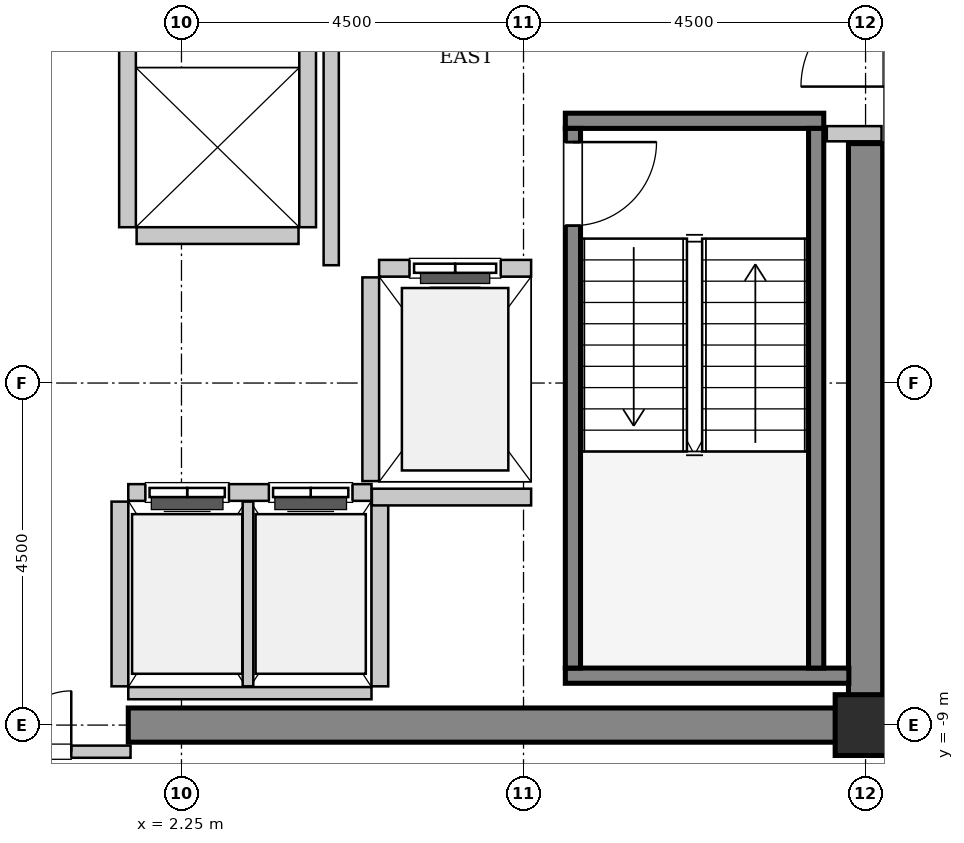
"""IFC4 building model, lengths in metres.
Left out: names, types, materials, properties, quantities, classifications, styles, units other than length and angle.
Written with IfcOpenShell. Run it as: python <this file> out.ifc"""

import sys

from ifc_helpers import new_model, si_unit, direction, frame, frame_2d, origin, origin_2d, place, context, subcontext, project, spatial, rectangle, hollow_rectangle, extrude, source, transform, mapped, element, fill, save


model = new_model("IFC4")
c1 = context("Model", 3, precision=1e-05, world=origin(), true_north=direction((0.0, 1.0)))
c2 = subcontext(c1, "Body", "Model", "MODEL_VIEW")
j1 = project(units=[si_unit("LENGTHUNIT", "METRE"), si_unit("PLANEANGLEUNIT", "RADIAN")], contexts=[c1])
p1 = place(None, origin())
s1 = spatial("IfcSite", under=j1, at=p1, CompositionType="ELEMENT")
p2 = place(p1, origin())
s2 = spatial("IfcBuilding", under=s1, at=p2, CompositionType="ELEMENT")
p3 = place(p2, frame((0.0, 0.0, 248.4)))
s3 = spatial("IfcBuildingStorey", under=s2, at=p3, CompositionType="ELEMENT", Elevation=248.4)
m1 = source(origin(), c2, "Body", "SweptSolid", [
    extrude(rectangle(XDim=9.925, YDim=0.45, at=frame_2d((4.962, 0.0))), origin(), (0.0, 0.0, 1.0), 3.8),
])
p4 = place(p3, frame((1.55, -9.0, 0.0), z_axis=(0.0, 0.0, 1.0), x_axis=(1.0, 0.0, 0.0)))
e1 = element("IfcWall", 1, at=p4, inside=s3, PredefinedType="SHEAR", context=c2, shape_type="MappedRepresentation", body=[
    mapped(m1, transform((0.0, 0.0, 0.0), x_axis=(1.0, 0.0, 0.0), y_axis=(0.0, 1.0, 0.0), z_axis=(0.0, 0.0, 1.0), scale=1.0)),
])
m2 = source(origin(), c2, "Body", "SweptSolid", [
    extrude(rectangle(XDim=7.425, YDim=0.45, at=frame_2d((3.712, 0.0))), origin(), (0.0, 0.0, 1.0), 3.8),
])
p5 = place(p3, frame((11.25, -8.775, 0.0), z_axis=(0.0, 0.0, 1.0), x_axis=(0.0, 1.0, 0.0)))
e2 = element("IfcWall", 2, at=p5, inside=s3, PredefinedType="SHEAR", context=c2, shape_type="MappedRepresentation", body=[
    mapped(m2, transform((0.0, 0.0, 0.0), x_axis=(1.0, 0.0, 0.0), y_axis=(0.0, 1.0, 0.0), z_axis=(0.0, 0.0, 1.0), scale=1.0)),
])
m3 = source(origin(), c2, "Body", "SweptSolid", [
    extrude(hollow_rectangle(XDim=0.8, YDim=0.8, WallThickness=0.04, InnerFilletRadius=0.04, OuterFilletRadius=0.08, at=origin_2d()), origin(), (0.0, 0.0, 1.0), 3.8),
])
p6 = place(p3, frame((11.25, -9.0, 0.0), z_axis=(0.0, 0.0, 1.0), x_axis=(1.0, 0.0, 0.0)))
e3 = element("IfcColumn", 3, at=p6, inside=s3, PredefinedType="COLUMN", context=c2, shape_type="MappedRepresentation", body=[
    mapped(m3, transform((0.0, 0.0, 0.0), x_axis=(1.0, 0.0, 0.0), y_axis=(0.0, 1.0, 0.0), z_axis=(0.0, 0.0, 1.0), scale=1.0)),
])
m4 = source(origin(), c2, "Body", "SweptSolid", [
    extrude(rectangle(XDim=3.4, YDim=0.2, at=frame_2d((1.7, 0.0))), origin(), (0.0, 0.0, 1.0), 3.8),
])
p7 = place(p3, frame((7.3, -1.05, 0.0), z_axis=(0.0, 0.0, 1.0), x_axis=(1.0, 0.0, 0.0)))
e4 = element("IfcWall", 4, at=p7, inside=s3, PredefinedType="SOLIDWALL", context=c2, shape_type="MappedRepresentation", body=[
    mapped(m4, transform((0.0, 0.0, 0.0), x_axis=(1.0, 0.0, 0.0), y_axis=(0.0, 1.0, 0.0), z_axis=(0.0, 0.0, 1.0), scale=1.0)),
])
m5 = source(origin(), c2, "Body", "SweptSolid", [
    extrude(rectangle(XDim=3.73, YDim=0.2, at=frame_2d((1.865, 0.0))), origin(), (0.0, 0.0, 1.0), 3.8),
])
p8 = place(p3, frame((7.3, -8.35, 0.0), z_axis=(0.0, 0.0, 1.0), x_axis=(1.0, 0.0, 0.0)))
e5 = element("IfcWall", 5, at=p8, inside=s3, PredefinedType="SOLIDWALL", context=c2, shape_type="MappedRepresentation", body=[
    mapped(m5, transform((0.0, 0.0, 0.0), x_axis=(1.0, 0.0, 0.0), y_axis=(0.0, 1.0, 0.0), z_axis=(0.0, 0.0, 1.0), scale=1.0)),
])
m6 = source(origin(), c2, "Body", "SweptSolid", [
    extrude(rectangle(XDim=7.1, YDim=0.2, at=frame_2d((3.55, 0.0))), origin(), (0.0, 0.0, 1.0), 3.8),
])
p9 = place(p3, frame((7.4, -1.15, 0.0), z_axis=(0.0, 0.0, 1.0), x_axis=(0.0, -1.0, 0.0)))
e6 = element("IfcWall", 6, at=p9, inside=s3, PredefinedType="SOLIDWALL", context=c2, shape_type="MappedRepresentation", body=[
    mapped(m6, transform((0.0, 0.0, 0.0), x_axis=(1.0, 0.0, 0.0), y_axis=(0.0, 1.0, 0.0), z_axis=(0.0, 0.0, 1.0), scale=1.0)),
])
p10 = place(p9, frame((0.18, 0.0, 0.0)))
e7 = element("IfcOpeningElement", 7, at=p10, cuts=e6, PredefinedType="OPENING", context=c2, shape_type="SweptSolid", body=[
    extrude(rectangle(XDim=1.1, YDim=2.15, at=frame_2d((0.55, 1.075))), frame((0.0, 0.11, 0.0), z_axis=(0.0, -1.0, 0.0), x_axis=(1.0, 0.0, 0.0)), (0.0, 0.0, 1.0), 0.22),
])
p11 = place(p3, frame((10.6, -1.15, 0.0), z_axis=(0.0, 0.0, 1.0), x_axis=(0.0, -1.0, 0.0)))
e8 = element("IfcWall", 8, at=p11, inside=s3, PredefinedType="SOLIDWALL", context=c2, shape_type="MappedRepresentation", body=[
    mapped(m6, transform((0.0, 0.0, 0.0), x_axis=(1.0, 0.0, 0.0), y_axis=(0.0, 1.0, 0.0), z_axis=(0.0, 0.0, 1.0), scale=1.0)),
])
m7 = source(origin(), c2, "Body", "SweptSolid", [
    extrude(rectangle(XDim=2.0, YDim=0.22, at=frame_2d((1.0, 0.0))), origin(), (0.0, 0.0, 1.0), 3.535),
])
p12 = place(p3, frame((6.85, -2.99, 0.0), z_axis=(0.0, 0.0, 1.0), x_axis=(-1.0, 0.0, 0.0)))
e9 = element("IfcWall", 9, at=p12, inside=s3, PredefinedType="SOLIDWALL", context=c2, shape_type="MappedRepresentation", body=[
    mapped(m7, transform((0.0, 0.0, 0.0), x_axis=(1.0, 0.0, 0.0), y_axis=(0.0, 1.0, 0.0), z_axis=(0.0, 0.0, 1.0), scale=1.0)),
])
p13 = place(p12, frame((0.4, 0.0, 0.0)))
e10 = element("IfcOpeningElement", 10, at=p13, cuts=e9, PredefinedType="OPENING", context=c2, shape_type="SweptSolid", body=[
    extrude(rectangle(XDim=1.2, YDim=2.2, at=frame_2d((0.6, 1.1))), frame((0.0, 0.12, 0.0), z_axis=(0.0, -1.0, 0.0), x_axis=(1.0, 0.0, 0.0)), (0.0, 0.0, 1.0), 0.24),
])
m8 = source(origin(), c2, "Body", "SweptSolid", [
    extrude(rectangle(XDim=2.68, YDim=0.22, at=frame_2d((1.34, 0.0))), origin(), (0.0, 0.0, 1.0), 3.535),
])
p14 = place(p3, frame((4.74, -3.11, 0.0), z_axis=(0.0, 0.0, 1.0), x_axis=(0.0, -1.0, 0.0)))
e11 = element("IfcWall", 11, at=p14, inside=s3, PredefinedType="SOLIDWALL", context=c2, shape_type="MappedRepresentation", body=[
    mapped(m8, transform((0.0, 0.0, 0.0), x_axis=(1.0, 0.0, 0.0), y_axis=(0.0, 1.0, 0.0), z_axis=(0.0, 0.0, 1.0), scale=1.0)),
])
m9 = source(origin(), c2, "Body", "SweptSolid", [
    extrude(rectangle(XDim=3.2, YDim=0.22, at=frame_2d((1.6, 0.0))), origin(), (0.0, 0.0, 1.0), 3.535),
])
p15 = place(p3, frame((4.75, -5.94, 0.0), z_axis=(0.0, 0.0, 1.0), x_axis=(-1.0, 0.0, 0.0)))
e12 = element("IfcWall", 12, at=p15, inside=s3, PredefinedType="SOLIDWALL", context=c2, shape_type="MappedRepresentation", body=[
    mapped(m9, transform((0.0, 0.0, 0.0), x_axis=(1.0, 0.0, 0.0), y_axis=(0.0, 1.0, 0.0), z_axis=(0.0, 0.0, 1.0), scale=1.0)),
])
p16 = place(p15, frame((1.875, 0.0, 0.0)))
e13 = element("IfcOpeningElement", 13, at=p16, cuts=e12, PredefinedType="OPENING", context=c2, shape_type="SweptSolid", body=[
    extrude(rectangle(XDim=1.1, YDim=2.2, at=frame_2d((0.55, 1.1))), frame((0.0, 0.12, 0.0), z_axis=(0.0, -1.0, 0.0), x_axis=(1.0, 0.0, 0.0)), (0.0, 0.0, 1.0), 0.24),
])
p17 = place(p15, frame((0.25, 0.0, 0.0)))
e14 = element("IfcOpeningElement", 14, at=p17, cuts=e12, PredefinedType="OPENING", context=c2, shape_type="SweptSolid", body=[
    extrude(rectangle(XDim=1.1, YDim=2.2, at=frame_2d((0.55, 1.1))), frame((0.0, 0.12, 0.0), z_axis=(0.0, -1.0, 0.0), x_axis=(1.0, 0.0, 0.0)), (0.0, 0.0, 1.0), 0.24),
])
m10 = source(origin(), c2, "Body", "SweptSolid", [
    extrude(rectangle(XDim=3.2, YDim=0.16, at=frame_2d((1.6, 0.0))), origin(), (0.0, 0.0, 1.0), 2.625),
])
p18 = place(p3, frame((1.55, -8.58, 0.0), z_axis=(0.0, 0.0, 1.0), x_axis=(1.0, 0.0, 0.0)))
e15 = element("IfcWall", 15, at=p18, inside=s3, PredefinedType="PARTITIONING", context=c2, shape_type="MappedRepresentation", body=[
    mapped(m10, transform((0.0, 0.0, 0.0), x_axis=(1.0, 0.0, 0.0), y_axis=(0.0, 1.0, 0.0), z_axis=(0.0, 0.0, 1.0), scale=1.0)),
])
m11 = source(origin(), c2, "Body", "SweptSolid", [
    extrude(rectangle(XDim=2.43, YDim=0.22, at=frame_2d((1.215, 0.0))), origin(), (0.0, 0.0, 1.0), 3.535),
])
p19 = place(p3, frame((1.44, -6.06, 0.0), z_axis=(0.0, 0.0, 1.0), x_axis=(0.0, -1.0, 0.0)))
e16 = element("IfcWall", 16, at=p19, inside=s3, PredefinedType="SOLIDWALL", context=c2, shape_type="MappedRepresentation", body=[
    mapped(m11, transform((0.0, 0.0, 0.0), x_axis=(1.0, 0.0, 0.0), y_axis=(0.0, 1.0, 0.0), z_axis=(0.0, 0.0, 1.0), scale=1.0)),
])
m12 = source(origin(), c2, "Body", "SweptSolid", [
    extrude(rectangle(XDim=2.43, YDim=0.14, at=frame_2d((1.215, 0.0))), origin(), (0.0, 0.0, 1.0), 3.535),
])
p20 = place(p3, frame((3.125, -8.49, 0.0), z_axis=(0.0, 0.0, 1.0), x_axis=(0.0, 1.0, 0.0)))
e17 = element("IfcWall", 17, at=p20, inside=s3, PredefinedType="PARTITIONING", context=c2, shape_type="MappedRepresentation", body=[
    mapped(m12, transform((0.0, 0.0, 0.0), x_axis=(1.0, 0.0, 0.0), y_axis=(0.0, 1.0, 0.0), z_axis=(0.0, 0.0, 1.0), scale=1.0)),
])
p21 = place(p3, frame((4.86, -8.49, 0.0), z_axis=(0.0, 0.0, 1.0), x_axis=(0.0, 1.0, 0.0)))
e18 = element("IfcWall", 18, at=p21, inside=s3, PredefinedType="SOLIDWALL", context=c2, shape_type="MappedRepresentation", body=[
    mapped(m11, transform((0.0, 0.0, 0.0), x_axis=(1.0, 0.0, 0.0), y_axis=(0.0, 1.0, 0.0), z_axis=(0.0, 0.0, 1.0), scale=1.0)),
])
m13 = source(origin(), c2, "Body", "SweptSolid", [
    extrude(rectangle(XDim=4.9, YDim=0.22, at=frame_2d((2.45, 0.0))), origin(), (0.0, 0.0, 1.0), 3.535),
])
for number, where, z_axis, x_axis in (
    (19, (1.54, 2.45, 0.0), (0.0, 0.0, 1.0), (0.0, -1.0, 0.0)),
    (20, (3.91, -2.45, 0.0), (0.0, 0.0, 1.0), (0.0, 1.0, 0.0)),
):
    element("IfcWall", number, at=place(p3, frame(where, z_axis=z_axis, x_axis=x_axis)), inside=s3, PredefinedType="SOLIDWALL", context=c2, shape_type="MappedRepresentation", body=[
        mapped(m13, transform((0.0, 0.0, 0.0), x_axis=(1.0, 0.0, 0.0), y_axis=(0.0, 1.0, 0.0), z_axis=(0.0, 0.0, 1.0), scale=1.0)),
    ])
m14 = source(origin(), c2, "Body", "SweptSolid", [
    extrude(rectangle(XDim=2.13, YDim=0.22, at=frame_2d((1.065, 0.0))), origin(), (0.0, 0.0, 1.0), 3.535),
])
p22 = place(p3, frame((1.66, -2.56, 0.0), z_axis=(0.0, 0.0, 1.0), x_axis=(1.0, 0.0, 0.0)))
e21 = element("IfcWall", 21, at=p22, inside=s3, PredefinedType="SOLIDWALL", context=c2, shape_type="MappedRepresentation", body=[
    mapped(m14, transform((0.0, 0.0, 0.0), x_axis=(1.0, 0.0, 0.0), y_axis=(0.0, 1.0, 0.0), z_axis=(0.0, 0.0, 1.0), scale=1.0)),
])
m15 = source(origin(), c2, "Body", "SweptSolid", [
    extrude(rectangle(XDim=2.095, YDim=0.22, at=frame_2d((1.048, 0.0))), origin(), (0.0, 0.0, 1.0), 3.535),
])
p23 = place(p3, frame((4.755, -6.0, 0.0), z_axis=(0.0, 0.0, 1.0), x_axis=(1.0, 0.0, 0.0)))
e22 = element("IfcWall", 22, at=p23, inside=s3, PredefinedType="SOLIDWALL", context=c2, shape_type="MappedRepresentation", body=[
    mapped(m15, transform((0.0, 0.0, 0.0), x_axis=(1.0, 0.0, 0.0), y_axis=(0.0, 1.0, 0.0), z_axis=(0.0, 0.0, 1.0), scale=1.0)),
])
m16 = source(origin(), c2, "Body", "SweptSolid", [
    extrude(rectangle(XDim=5.9, YDim=0.2, at=frame_2d((2.95, 0.0))), origin(), (0.0, 0.0, 1.0), 3.535),
])
p24 = place(p3, frame((4.22, -2.95, 0.0), z_axis=(0.0, 0.0, 1.0), x_axis=(0.0, 1.0, 0.0)))
e23 = element("IfcWall", 23, at=p24, inside=s3, PredefinedType="PARTITIONING", context=c2, shape_type="MappedRepresentation", body=[
    mapped(m16, transform((0.0, 0.0, 0.0), x_axis=(1.0, 0.0, 0.0), y_axis=(0.0, 1.0, 0.0), z_axis=(0.0, 0.0, 1.0), scale=1.0)),
])
m17 = source(origin(), c2, "Body", "SweptSolid", [
    extrude(rectangle(XDim=0.72, YDim=0.2, at=frame_2d((0.36, 0.0))), origin(), (0.0, 0.0, 1.0), 3.535),
])
p25 = place(p3, frame((10.74, -1.22, 0.0), z_axis=(0.0, 0.0, 1.0), x_axis=(1.0, 0.0, 0.0)))
e24 = element("IfcWall", 24, at=p25, inside=s3, PredefinedType="PARTITIONING", context=c2, shape_type="MappedRepresentation", body=[
    mapped(m17, transform((0.0, 0.0, 0.0), x_axis=(1.0, 0.0, 0.0), y_axis=(0.0, 1.0, 0.0), z_axis=(0.0, 0.0, 1.0), scale=1.0)),
])
m18 = source(origin(), c2, "Body", "SweptSolid", [
    extrude(rectangle(XDim=3.16, YDim=0.16, at=frame_2d((1.58, 0.0))), origin(), (0.0, 0.0, 1.0), 2.625),
])
p26 = place(p3, frame((-1.58, -9.35, 0.0), z_axis=(0.0, 0.0, 1.0), x_axis=(1.0, 0.0, 0.0)))
e25 = element("IfcWall", 25, at=p26, inside=s3, PredefinedType="PARTITIONING", context=c2, shape_type="MappedRepresentation", body=[
    mapped(m18, transform((0.0, 0.0, 0.0), x_axis=(1.0, 0.0, 0.0), y_axis=(0.0, 1.0, 0.0), z_axis=(0.0, 0.0, 1.0), scale=1.0)),
])
p27 = place(p26, frame((0.78, 0.0, 0.0)))
e26 = element("IfcOpeningElement", 26, at=p27, cuts=e25, PredefinedType="OPENING", context=c2, shape_type="SweptSolid", body=[
    extrude(rectangle(XDim=1.6, YDim=2.3, at=frame_2d((0.8, 1.15))), frame((0.0, 0.09, 0.0), z_axis=(0.0, -1.0, 0.0), x_axis=(1.0, 0.0, 0.0)), (0.0, 0.0, 1.0), 0.18),
])
m19 = source(origin(), c2, "Body", "SweptSolid", [
    extrude(rectangle(XDim=1.1, YDim=2.15, at=frame_2d((0.55, 1.075))), frame((0.0, 0.025, 0.0), z_axis=(0.0, -1.0, 0.0), x_axis=(1.0, 0.0, 0.0)), (0.0, 0.0, 1.0), 0.05),
])
p28 = place(p10, origin())
e27 = element("IfcDoor", 27, at=p28, inside=s3, OperationType="SINGLE_SWING_LEFT", PredefinedType="DOOR", context=c2, shape_type="MappedRepresentation", body=[
    mapped(m19, transform((0.0, 0.0, 0.0), x_axis=(1.0, 0.0, 0.0), y_axis=(0.0, 1.0, 0.0), z_axis=(0.0, 0.0, 1.0), scale=1.0)),
])
fill(e7, e27)
m20 = source(origin(), c2, "Body", "SweptSolid", [
    extrude(rectangle(XDim=1.2, YDim=2.2, at=frame_2d((0.6, 1.1))), frame((0.0, 0.025, 0.0), z_axis=(0.0, -1.0, 0.0), x_axis=(1.0, 0.0, 0.0)), (0.0, 0.0, 1.0), 0.05),
])
p29 = place(p13, origin())
e28 = element("IfcDoor", 28, at=p29, inside=s3, OperationType="SLIDING_TO_LEFT", PredefinedType="DOOR", context=c2, shape_type="MappedRepresentation", body=[
    mapped(m20, transform((0.0, 0.0, 0.0), x_axis=(1.0, 0.0, 0.0), y_axis=(0.0, 1.0, 0.0), z_axis=(0.0, 0.0, 1.0), scale=1.0)),
])
fill(e10, e28)
m21 = source(origin(), c2, "Body", "SweptSolid", [
    extrude(rectangle(XDim=1.1, YDim=2.2, at=frame_2d((0.55, 1.1))), frame((0.0, 0.025, 0.0), z_axis=(0.0, -1.0, 0.0), x_axis=(1.0, 0.0, 0.0)), (0.0, 0.0, 1.0), 0.05),
])
p30 = place(p16, origin())
e29 = element("IfcDoor", 29, at=p30, inside=s3, OperationType="DOUBLE_DOOR_SLIDING", PredefinedType="DOOR", context=c2, shape_type="MappedRepresentation", body=[
    mapped(m21, transform((0.0, 0.0, 0.0), x_axis=(1.0, 0.0, 0.0), y_axis=(0.0, 1.0, 0.0), z_axis=(0.0, 0.0, 1.0), scale=1.0)),
])
fill(e13, e29)
p31 = place(p17, origin())
e30 = element("IfcDoor", 30, at=p31, inside=s3, OperationType="DOUBLE_DOOR_SLIDING", PredefinedType="DOOR", context=c2, shape_type="MappedRepresentation", body=[
    mapped(m21, transform((0.0, 0.0, 0.0), x_axis=(1.0, 0.0, 0.0), y_axis=(0.0, 1.0, 0.0), z_axis=(0.0, 0.0, 1.0), scale=1.0)),
])
fill(e14, e30)
m22 = source(origin(), c2, "Body", "SweptSolid", [
    extrude(rectangle(XDim=1.6, YDim=2.3, at=frame_2d((0.8, 1.15))), frame((0.0, 0.025, 0.0), z_axis=(0.0, -1.0, 0.0), x_axis=(1.0, 0.0, 0.0)), (0.0, 0.0, 1.0), 0.05),
])
p32 = place(p27, origin())
e31 = element("IfcDoor", 31, at=p32, inside=s3, OperationType="DOUBLE_DOOR_SINGLE_SWING", PredefinedType="DOOR", context=c2, shape_type="MappedRepresentation", body=[
    mapped(m22, transform((0.0, 0.0, 0.0), x_axis=(1.0, 0.0, 0.0), y_axis=(0.0, 1.0, 0.0), z_axis=(0.0, 0.0, 1.0), scale=1.0)),
])
fill(e26, e31)
save(model, sys.argv[1])
